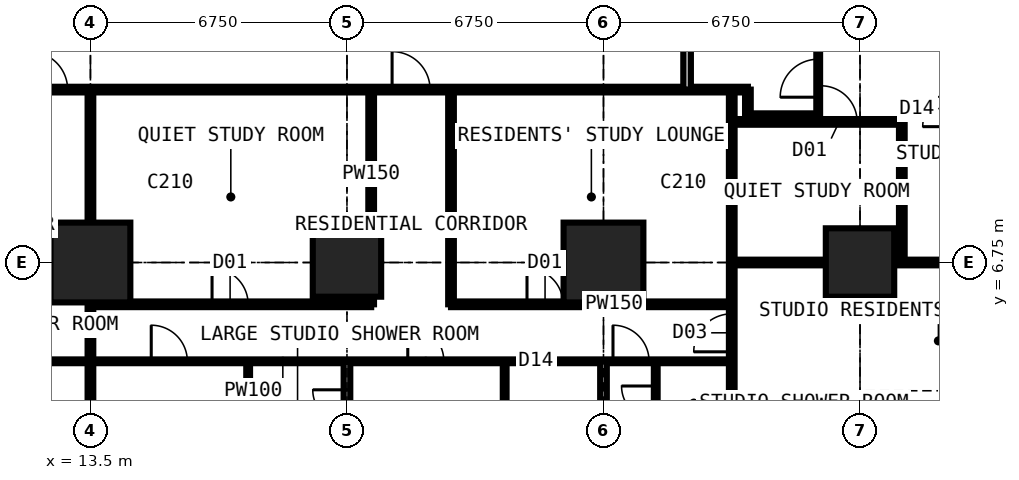
"""IFC4 building model, lengths in metres.
Left out: names, types, materials, properties, quantities, classifications, styles, units other than length and angle.
Written with IfcOpenShell. Run it as: python <this file> out.ifc"""

import sys

from ifc_helpers import new_model, si_unit, direction, frame, frame_2d, origin, origin_2d, place, context, subcontext, project, spatial, rectangle, extrude, element, fill, save


model = new_model("IFC4")
c1 = context("Model", 3, precision=1e-05, world=origin(), true_north=direction((0.0, 1.0)))
c2 = subcontext(c1, "Body", "Model", "MODEL_VIEW")
j1 = project(units=[si_unit("LENGTHUNIT", "METRE"), si_unit("PLANEANGLEUNIT", "RADIAN")], contexts=[c1])
p1 = place(None, origin())
s1 = spatial("IfcSite", under=j1, at=p1, CompositionType="ELEMENT")
p2 = place(p1, origin())
s2 = spatial("IfcBuilding", under=s1, at=p2, CompositionType="ELEMENT")
p3 = place(p2, frame((0.0, 0.0, 72.0)))
s3 = spatial("IfcBuildingStorey", under=s2, at=p3, CompositionType="ELEMENT", Elevation=72.0)
p4 = place(p3, frame((13.5, 6.75, 0.0), z_axis=(0.0, 0.0, 1.0), x_axis=(1.0, 0.0, 0.0)))
e1 = element("IfcColumn", 1, at=p4, inside=s3, PredefinedType="COLUMN", context=c2, shape_type="SweptSolid", body=[
    extrude(rectangle(XDim=2.1, YDim=2.1, at=origin_2d()), origin(), (0.0, 0.0, 1.0), 3.6),
])
p5 = place(p3, frame((20.25, 6.75, 0.0), z_axis=(0.0, 0.0, 1.0), x_axis=(1.0, 0.0, 0.0)))
e2 = element("IfcColumn", 2, at=p5, inside=s3, PredefinedType="COLUMN", context=c2, shape_type="SweptSolid", body=[
    extrude(rectangle(XDim=1.8, YDim=1.8, at=origin_2d()), origin(), (0.0, 0.0, 1.0), 3.6),
])
p6 = place(p3, frame((27.0, 6.75, 0.0), z_axis=(0.0, 0.0, 1.0), x_axis=(1.0, 0.0, 0.0)))
e3 = element("IfcColumn", 3, at=p6, inside=s3, PredefinedType="COLUMN", context=c2, shape_type="SweptSolid", body=[
    extrude(rectangle(XDim=2.1, YDim=2.1, at=origin_2d()), origin(), (0.0, 0.0, 1.0), 3.6),
])
p7 = place(p3, frame((33.75, 6.75, 0.0), z_axis=(0.0, 0.0, 1.0), x_axis=(1.0, 0.0, 0.0)))
e4 = element("IfcColumn", 4, at=p7, inside=s3, PredefinedType="COLUMN", context=c2, shape_type="SweptSolid", body=[
    extrude(rectangle(XDim=1.8, YDim=1.8, at=origin_2d()), origin(), (0.0, 0.0, 1.0), 3.6),
])
p8 = place(p3, frame((6.75, 4.15, 0.0), z_axis=(0.0, 0.0, 1.0), x_axis=(1.0, 0.0, 0.0)))
e5 = element("IfcWall", 5, at=p8, inside=s3, PredefinedType="PARTITIONING", context=c2, shape_type="SweptSolid", body=[
    extrude(rectangle(XDim=23.625, YDim=0.1, at=frame_2d((11.812, 0.0))), origin(), (0.0, 0.0, 1.0), 3.3),
])
p9 = place(p8, frame((0.2, 0.0, 0.0)))
e6 = element("IfcOpeningElement", 6, at=p9, cuts=e5, PredefinedType="OPENING", context=c2, shape_type="SweptSolid", body=[
    extrude(rectangle(XDim=0.95, YDim=2.2, at=frame_2d((0.475, 1.1))), frame((0.0, 0.06, 0.0), z_axis=(0.0, -1.0, 0.0), x_axis=(1.0, 0.0, 0.0)), (0.0, 0.0, 1.0), 0.12),
])
p10 = place(p8, frame((3.625, 0.0, 0.0)))
e7 = element("IfcOpeningElement", 7, at=p10, cuts=e5, PredefinedType="OPENING", context=c2, shape_type="SweptSolid", body=[
    extrude(rectangle(XDim=0.95, YDim=2.2, at=frame_2d((0.475, 1.1))), frame((0.0, 0.06, 0.0), z_axis=(0.0, -1.0, 0.0), x_axis=(1.0, 0.0, 0.0)), (0.0, 0.0, 1.0), 0.12),
])
p11 = place(p8, frame((15.1, 0.0, 0.0)))
e8 = element("IfcOpeningElement", 8, at=p11, cuts=e5, PredefinedType="OPENING", context=c2, shape_type="SweptSolid", body=[
    extrude(rectangle(XDim=0.95, YDim=2.2, at=frame_2d((0.475, 1.1))), frame((0.0, 0.06, 0.0), z_axis=(0.0, -1.0, 0.0), x_axis=(1.0, 0.0, 0.0)), (0.0, 0.0, 1.0), 0.12),
])
p12 = place(p8, frame((8.35, 0.0, 0.0)))
e9 = element("IfcOpeningElement", 9, at=p12, cuts=e5, PredefinedType="OPENING", context=c2, shape_type="SweptSolid", body=[
    extrude(rectangle(XDim=0.95, YDim=2.2, at=frame_2d((0.475, 1.1))), frame((0.0, 0.06, 0.0), z_axis=(0.0, -1.0, 0.0), x_axis=(1.0, 0.0, 0.0)), (0.0, 0.0, 1.0), 0.12),
])
p13 = place(p8, frame((20.5, 0.0, 0.0)))
e10 = element("IfcOpeningElement", 10, at=p13, cuts=e5, PredefinedType="OPENING", context=c2, shape_type="SweptSolid", body=[
    extrude(rectangle(XDim=0.95, YDim=2.2, at=frame_2d((0.475, 1.1))), frame((0.0, 0.06, 0.0), z_axis=(0.0, -1.0, 0.0), x_axis=(1.0, 0.0, 0.0)), (0.0, 0.0, 1.0), 0.12),
])
p14 = place(p3, frame((10.125, 11.3, 0.0), z_axis=(0.0, 0.0, 1.0), x_axis=(1.0, 0.0, 0.0)))
e11 = element("IfcWall", 11, at=p14, inside=s3, PredefinedType="PARTITIONING", context=c2, shape_type="SweptSolid", body=[
    extrude(rectangle(XDim=20.675, YDim=0.15, at=frame_2d((10.337, 0.0))), origin(), (0.0, 0.0, 1.0), 3.3),
])
p15 = place(p14, frame((1.775, 0.0, 0.0)))
e12 = element("IfcOpeningElement", 12, at=p15, cuts=e11, PredefinedType="OPENING", context=c2, shape_type="SweptSolid", body=[
    extrude(rectangle(XDim=1.0, YDim=2.2, at=frame_2d((0.5, 1.1))), frame((0.0, 0.085, 0.0), z_axis=(0.0, -1.0, 0.0), x_axis=(1.0, 0.0, 0.0)), (0.0, 0.0, 1.0), 0.17),
])
p16 = place(p14, frame((11.312, 0.0, 0.0)))
e13 = element("IfcOpeningElement", 13, at=p16, cuts=e11, PredefinedType="OPENING", context=c2, shape_type="SweptSolid", body=[
    extrude(rectangle(XDim=1.0, YDim=2.2, at=frame_2d((0.5, 1.1))), frame((0.0, 0.085, 0.0), z_axis=(0.0, -1.0, 0.0), x_axis=(1.0, 0.0, 0.0)), (0.0, 0.0, 1.0), 0.17),
])
p17 = place(p3, frame((13.5, -0.734, 0.0), z_axis=(0.0, 0.0, 1.0), x_axis=(0.0, 1.0, 0.0)))
e14 = element("IfcWall", 14, at=p17, inside=s3, PredefinedType="PARTITIONING", context=c2, shape_type="SweptSolid", body=[
    extrude(rectangle(XDim=12.034, YDim=0.15, at=frame_2d((6.017, 0.0))), origin(), (0.0, 0.0, 1.0), 2.802),
])
p18 = place(p3, frame((13.5, 5.65, 0.0), z_axis=(0.0, 0.0, 1.0), x_axis=(1.0, 0.0, 0.0)))
e15 = element("IfcWall", 15, at=p18, inside=s3, PredefinedType="PARTITIONING", context=c2, shape_type="SweptSolid", body=[
    extrude(rectangle(XDim=7.387, YDim=0.15, at=frame_2d((3.694, 0.0))), origin(), (0.0, 0.0, 1.0), 3.3),
])
p19 = place(p18, frame((3.2, 0.0, 0.0)))
e16 = element("IfcOpeningElement", 16, at=p19, cuts=e15, PredefinedType="OPENING", context=c2, shape_type="SweptSolid", body=[
    extrude(rectangle(XDim=0.95, YDim=2.2, at=frame_2d((0.475, 1.1))), frame((0.0, 0.085, 0.0), z_axis=(0.0, -1.0, 0.0), x_axis=(1.0, 0.0, 0.0)), (0.0, 0.0, 1.0), 0.17),
])
p20 = place(p3, frame((17.65, 1.75, 0.0), z_axis=(0.0, 0.0, 1.0), x_axis=(0.0, 1.0, 0.0)))
e17 = element("IfcWall", 17, at=p20, inside=s3, PredefinedType="PARTITIONING", context=c2, shape_type="SweptSolid", body=[
    extrude(rectangle(XDim=2.4, YDim=0.1, at=frame_2d((1.2, 0.0))), origin(), (0.0, 0.0, 1.0), 3.3),
])
p21 = place(p3, frame((20.25, -0.734, 0.0), z_axis=(0.0, 0.0, 1.0), x_axis=(0.0, 1.0, 0.0)))
e18 = element("IfcWall", 18, at=p21, inside=s3, PredefinedType="PARTITIONING", context=c2, shape_type="SweptSolid", body=[
    extrude(rectangle(XDim=4.884, YDim=0.175, at=frame_2d((2.442, 0.0))), origin(), (0.0, 0.0, 1.0), 2.802),
])
p22 = place(p21, frame((3.234, 0.0, 0.0)))
e19 = element("IfcOpeningElement", 19, at=p22, cuts=e18, PredefinedType="OPENING", context=c2, shape_type="SweptSolid", body=[
    extrude(rectangle(XDim=0.9, YDim=2.2, at=frame_2d((0.45, 1.1))), frame((0.0, 0.097, 0.0), z_axis=(0.0, -1.0, 0.0), x_axis=(1.0, 0.0, 0.0)), (0.0, 0.0, 1.0), 0.195),
])
p23 = place(p3, frame((20.887, 5.65, 0.0), z_axis=(0.0, 0.0, 1.0), x_axis=(0.0, 1.0, 0.0)))
e20 = element("IfcWall", 20, at=p23, inside=s3, PredefinedType="PARTITIONING", context=c2, shape_type="SweptSolid", body=[
    extrude(rectangle(XDim=5.65, YDim=0.15, at=frame_2d((2.825, 0.0))), origin(), (0.0, 0.0, 1.0), 3.3),
])
p24 = place(p3, frame((22.988, 5.65, 0.0), z_axis=(0.0, 0.0, 1.0), x_axis=(1.0, 0.0, 0.0)))
e21 = element("IfcWall", 21, at=p24, inside=s3, PredefinedType="PARTITIONING", context=c2, shape_type="SweptSolid", body=[
    extrude(rectangle(XDim=7.387, YDim=0.15, at=frame_2d((3.694, 0.0))), origin(), (0.0, 0.0, 1.0), 3.3),
])
p25 = place(p24, frame((2.0, 0.0, 0.0)))
e22 = element("IfcOpeningElement", 22, at=p25, cuts=e21, PredefinedType="OPENING", context=c2, shape_type="SweptSolid", body=[
    extrude(rectangle(XDim=0.95, YDim=2.2, at=frame_2d((0.475, 1.1))), frame((0.0, 0.085, 0.0), z_axis=(0.0, -1.0, 0.0), x_axis=(1.0, 0.0, 0.0)), (0.0, 0.0, 1.0), 0.17),
])
p26 = place(p3, frame((22.988, 5.65, 0.0), z_axis=(0.0, 0.0, 1.0), x_axis=(0.0, 1.0, 0.0)))
e23 = element("IfcWall", 23, at=p26, inside=s3, PredefinedType="PARTITIONING", context=c2, shape_type="SweptSolid", body=[
    extrude(rectangle(XDim=5.65, YDim=0.15, at=frame_2d((2.825, 0.0))), origin(), (0.0, 0.0, 1.0), 3.3),
])
p27 = place(p3, frame((24.4, 1.75, 0.0), z_axis=(0.0, 0.0, 1.0), x_axis=(0.0, 1.0, 0.0)))
e24 = element("IfcWall", 24, at=p27, inside=s3, PredefinedType="PARTITIONING", context=c2, shape_type="SweptSolid", body=[
    extrude(rectangle(XDim=2.4, YDim=0.1, at=frame_2d((1.2, 0.0))), origin(), (0.0, 0.0, 1.0), 3.3),
])
p28 = place(p3, frame((27.0, -0.734, 0.0), z_axis=(0.0, 0.0, 1.0), x_axis=(0.0, 1.0, 0.0)))
e25 = element("IfcWall", 25, at=p28, inside=s3, PredefinedType="PARTITIONING", context=c2, shape_type="SweptSolid", body=[
    extrude(rectangle(XDim=4.884, YDim=0.175, at=frame_2d((2.442, 0.0))), origin(), (0.0, 0.0, 1.0), 2.802),
])
p29 = place(p3, frame((28.375, 1.95, 0.0), z_axis=(0.0, 0.0, 1.0), x_axis=(0.0, 1.0, 0.0)))
e26 = element("IfcWall", 26, at=p29, inside=s3, PredefinedType="PARTITIONING", context=c2, shape_type="SweptSolid", body=[
    extrude(rectangle(XDim=2.2, YDim=0.1, at=frame_2d((1.1, 0.0))), origin(), (0.0, 0.0, 1.0), 3.3),
])
p30 = place(p29, frame((0.65, 0.0, 0.0)))
e27 = element("IfcOpeningElement", 27, at=p30, cuts=e26, PredefinedType="OPENING", context=c2, shape_type="SweptSolid", body=[
    extrude(rectangle(XDim=0.9, YDim=2.2, at=frame_2d((0.45, 1.1))), frame((0.0, 0.06, 0.0), z_axis=(0.0, -1.0, 0.0), x_axis=(1.0, 0.0, 0.0)), (0.0, 0.0, 1.0), 0.12),
])
p31 = place(p3, frame((29.2, 11.3, 0.0), z_axis=(0.0, 0.0, 1.0), x_axis=(0.0, 1.0, 0.0)))
e28 = element("IfcWall", 28, at=p31, inside=s3, PredefinedType="PARTITIONING", context=c2, shape_type="SweptSolid", body=[
    extrude(rectangle(XDim=17.9, YDim=0.2, at=frame_2d((8.95, 0.0))), origin(), (0.0, 0.0, 1.0), 3.3),
])
p32 = place(p31, frame((8.35, 0.0, 0.0)))
e29 = element("IfcOpeningElement", 29, at=p32, cuts=e28, PredefinedType="OPENING", context=c2, shape_type="SweptSolid", body=[
    extrude(rectangle(XDim=1.2, YDim=2.2, at=frame_2d((0.6, 1.1))), frame((0.0, 0.11, 0.0), z_axis=(0.0, -1.0, 0.0), x_axis=(1.0, 0.0, 0.0)), (0.0, 0.0, 1.0), 0.22),
])
p33 = place(p3, frame((30.375, -0.734, 0.0), z_axis=(0.0, 0.0, 1.0), x_axis=(0.0, 1.0, 0.0)))
e30 = element("IfcWall", 30, at=p33, inside=s3, PredefinedType="PARTITIONING", context=c2, shape_type="SweptSolid", body=[
    extrude(rectangle(XDim=12.034, YDim=0.15, at=frame_2d((6.017, 0.0))), origin(), (0.0, 0.0, 1.0), 3.3),
])
p34 = place(p33, frame((5.134, 0.0, 0.0)))
e31 = element("IfcOpeningElement", 31, at=p34, cuts=e30, PredefinedType="OPENING", context=c2, shape_type="SweptSolid", body=[
    extrude(rectangle(XDim=1.0, YDim=2.2, at=frame_2d((0.5, 1.1))), frame((0.0, 0.085, 0.0), z_axis=(0.0, -1.0, 0.0), x_axis=(1.0, 0.0, 0.0)), (0.0, 0.0, 1.0), 0.17),
])
p35 = place(p3, frame((30.375, 6.75, 0.0), z_axis=(0.0, 0.0, 1.0), x_axis=(1.0, 0.0, 0.0)))
e32 = element("IfcWall", 32, at=p35, inside=s3, PredefinedType="PARTITIONING", context=c2, shape_type="SweptSolid", body=[
    extrude(rectangle(XDim=5.975, YDim=0.15, at=frame_2d((2.988, 0.0))), origin(), (0.0, 0.0, 1.0), 2.802),
])
p36 = place(p3, frame((30.375, 10.45, 0.0), z_axis=(0.0, 0.0, 1.0), x_axis=(1.0, 0.0, 0.0)))
e33 = element("IfcWall", 33, at=p36, inside=s3, PredefinedType="PARTITIONING", context=c2, shape_type="SweptSolid", body=[
    extrude(rectangle(XDim=4.475, YDim=0.15, at=frame_2d((2.238, 0.0))), origin(), (0.0, 0.0, 1.0), 3.3),
])
p37 = place(p36, frame((2.35, 0.0, 0.0)))
e34 = element("IfcOpeningElement", 34, at=p37, cuts=e33, PredefinedType="OPENING", context=c2, shape_type="SweptSolid", body=[
    extrude(rectangle(XDim=0.95, YDim=2.2, at=frame_2d((0.475, 1.1))), frame((0.0, 0.085, 0.0), z_axis=(0.0, -1.0, 0.0), x_axis=(1.0, 0.0, 0.0)), (0.0, 0.0, 1.0), 0.17),
])
p38 = place(p3, frame((30.8, 10.6, 0.0), z_axis=(0.0, 0.0, 1.0), x_axis=(0.0, 1.0, 0.0)))
e35 = element("IfcWall", 35, at=p38, inside=s3, PredefinedType="PARTITIONING", context=c2, shape_type="SweptSolid", body=[
    extrude(rectangle(XDim=0.7, YDim=0.15, at=frame_2d((0.35, 0.0))), origin(), (0.0, 0.0, 1.0), 3.3),
])
p39 = place(p3, frame((30.8, 10.6, 0.0), z_axis=(0.0, 0.0, 1.0), x_axis=(1.0, 0.0, 0.0)))
e36 = element("IfcWall", 36, at=p39, inside=s3, PredefinedType="PARTITIONING", context=c2, shape_type="SweptSolid", body=[
    extrude(rectangle(XDim=1.85, YDim=0.15, at=frame_2d((0.925, 0.0))), origin(), (0.0, 0.0, 1.0), 3.3),
])
p40 = place(p3, frame((32.65, 10.6, 0.0), z_axis=(0.0, 0.0, 1.0), x_axis=(0.0, 1.0, 0.0)))
e37 = element("IfcWall", 37, at=p40, inside=s3, PredefinedType="SHEAR", context=c2, shape_type="SweptSolid", body=[
    extrude(rectangle(XDim=9.3, YDim=0.1, at=frame_2d((4.65, 0.0))), origin(), (0.0, 0.0, 1.0), 3.3),
])
p41 = place(p40, frame((0.5, 0.0, 0.0)))
e38 = element("IfcOpeningElement", 38, at=p41, cuts=e37, PredefinedType="OPENING", context=c2, shape_type="SweptSolid", body=[
    extrude(rectangle(XDim=1.0, YDim=2.2, at=frame_2d((0.5, 1.1))), frame((0.0, 0.06, 0.0), z_axis=(0.0, -1.0, 0.0), x_axis=(1.0, 0.0, 0.0)), (0.0, 0.0, 1.0), 0.12),
])
p42 = place(p3, frame((34.85, 6.75, 0.0), z_axis=(0.0, 0.0, 1.0), x_axis=(0.0, 1.0, 0.0)))
e39 = element("IfcWall", 39, at=p42, inside=s3, PredefinedType="PARTITIONING", context=c2, shape_type="SweptSolid", body=[
    extrude(rectangle(XDim=3.7, YDim=0.15, at=frame_2d((1.85, 0.0))), origin(), (0.0, 0.0, 1.0), 3.3),
])
p43 = place(p15, origin())
e40 = element("IfcDoor", 40, at=p43, inside=s3, OperationType="SINGLE_SWING_LEFT", PredefinedType="DOOR", context=c2, shape_type="SweptSolid", body=[
    extrude(rectangle(XDim=1.0, YDim=2.2, at=frame_2d((0.5, 1.1))), frame((0.0, 0.025, 0.0), z_axis=(0.0, -1.0, 0.0), x_axis=(1.0, 0.0, 0.0)), (0.0, 0.0, 1.0), 0.05),
])
fill(e12, e40)
p44 = place(p11, origin())
e41 = element("IfcDoor", 41, at=p44, inside=s3, OperationType="SINGLE_SWING_LEFT", PredefinedType="DOOR", context=c2, shape_type="SweptSolid", body=[
    extrude(rectangle(XDim=0.95, YDim=2.2, at=frame_2d((0.475, 1.1))), frame((0.0, 0.025, 0.0), z_axis=(0.0, -1.0, 0.0), x_axis=(1.0, 0.0, 0.0)), (0.0, 0.0, 1.0), 0.05),
])
fill(e8, e41)
p45 = place(p12, origin())
e42 = element("IfcDoor", 42, at=p45, inside=s3, OperationType="SINGLE_SWING_LEFT", PredefinedType="DOOR", context=c2, shape_type="SweptSolid", body=[
    extrude(rectangle(XDim=0.95, YDim=2.2, at=frame_2d((0.475, 1.1))), frame((0.0, 0.025, 0.0), z_axis=(0.0, -1.0, 0.0), x_axis=(1.0, 0.0, 0.0)), (0.0, 0.0, 1.0), 0.05),
])
fill(e9, e42)
p46 = place(p22, origin())
e43 = element("IfcDoor", 43, at=p46, inside=s3, OperationType="SINGLE_SWING_RIGHT", PredefinedType="DOOR", context=c2, shape_type="SweptSolid", body=[
    extrude(rectangle(XDim=0.9, YDim=2.2, at=frame_2d((0.45, 1.1))), frame((0.0, 0.025, 0.0), z_axis=(0.0, -1.0, 0.0), x_axis=(1.0, 0.0, 0.0)), (0.0, 0.0, 1.0), 0.05),
])
fill(e19, e43)
p47 = place(p13, origin())
e44 = element("IfcDoor", 44, at=p47, inside=s3, OperationType="SINGLE_SWING_LEFT", PredefinedType="DOOR", context=c2, shape_type="SweptSolid", body=[
    extrude(rectangle(XDim=0.95, YDim=2.2, at=frame_2d((0.475, 1.1))), frame((0.0, 0.025, 0.0), z_axis=(0.0, -1.0, 0.0), x_axis=(1.0, 0.0, 0.0)), (0.0, 0.0, 1.0), 0.05),
])
fill(e10, e44)
p48 = place(p30, origin())
e45 = element("IfcDoor", 45, at=p48, inside=s3, OperationType="SINGLE_SWING_RIGHT", PredefinedType="DOOR", context=c2, shape_type="SweptSolid", body=[
    extrude(rectangle(XDim=0.9, YDim=2.2, at=frame_2d((0.45, 1.1))), frame((0.0, 0.025, 0.0), z_axis=(0.0, -1.0, 0.0), x_axis=(1.0, 0.0, 0.0)), (0.0, 0.0, 1.0), 0.05),
])
fill(e27, e45)
p49 = place(p16, origin())
e46 = element("IfcDoor", 46, at=p49, inside=s3, OperationType="SINGLE_SWING_LEFT", PredefinedType="DOOR", context=c2, shape_type="SweptSolid", body=[
    extrude(rectangle(XDim=1.0, YDim=2.2, at=frame_2d((0.5, 1.1))), frame((0.0, 0.025, 0.0), z_axis=(0.0, -1.0, 0.0), x_axis=(1.0, 0.0, 0.0)), (0.0, 0.0, 1.0), 0.05),
])
fill(e13, e46)
p50 = place(p25, origin())
e47 = element("IfcDoor", 47, at=p50, inside=s3, OperationType="SINGLE_SWING_LEFT", PredefinedType="DOOR", context=c2, shape_type="SweptSolid", body=[
    extrude(rectangle(XDim=0.95, YDim=2.2, at=frame_2d((0.475, 1.1))), frame((0.0, 0.025, 0.0), z_axis=(0.0, -1.0, 0.0), x_axis=(1.0, 0.0, 0.0)), (0.0, 0.0, 1.0), 0.05),
])
fill(e22, e47)
p51 = place(p19, origin())
e48 = element("IfcDoor", 48, at=p51, inside=s3, OperationType="SINGLE_SWING_LEFT", PredefinedType="DOOR", context=c2, shape_type="SweptSolid", body=[
    extrude(rectangle(XDim=0.95, YDim=2.2, at=frame_2d((0.475, 1.1))), frame((0.0, 0.025, 0.0), z_axis=(0.0, -1.0, 0.0), x_axis=(1.0, 0.0, 0.0)), (0.0, 0.0, 1.0), 0.05),
])
fill(e16, e48)
p52 = place(p34, origin())
e49 = element("IfcDoor", 49, at=p52, inside=s3, OperationType="SINGLE_SWING_LEFT", PredefinedType="DOOR", context=c2, shape_type="SweptSolid", body=[
    extrude(rectangle(XDim=1.0, YDim=2.2, at=frame_2d((0.5, 1.1))), frame((0.0, 0.025, 0.0), z_axis=(0.0, -1.0, 0.0), x_axis=(1.0, 0.0, 0.0)), (0.0, 0.0, 1.0), 0.05),
])
fill(e31, e49)
p53 = place(p41, origin())
e50 = element("IfcDoor", 50, at=p53, inside=s3, OperationType="SINGLE_SWING_LEFT", PredefinedType="DOOR", context=c2, shape_type="SweptSolid", body=[
    extrude(rectangle(XDim=1.0, YDim=2.2, at=frame_2d((0.5, 1.1))), frame((0.0, 0.025, 0.0), z_axis=(0.0, -1.0, 0.0), x_axis=(1.0, 0.0, 0.0)), (0.0, 0.0, 1.0), 0.05),
])
fill(e38, e50)
p54 = place(p37, origin())
e51 = element("IfcDoor", 51, at=p54, inside=s3, OperationType="SINGLE_SWING_LEFT", PredefinedType="DOOR", context=c2, shape_type="SweptSolid", body=[
    extrude(rectangle(XDim=0.95, YDim=2.2, at=frame_2d((0.475, 1.1))), frame((0.0, 0.025, 0.0), z_axis=(0.0, -1.0, 0.0), x_axis=(1.0, 0.0, 0.0)), (0.0, 0.0, 1.0), 0.05),
])
fill(e34, e51)
save(model, sys.argv[1])
